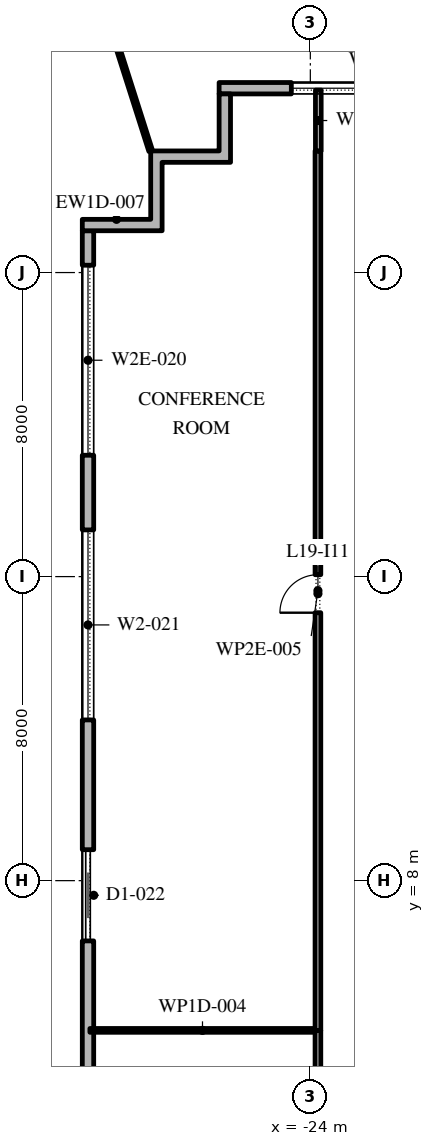
"""IFC4 building model, lengths in metres.
Left out: names, types, materials, properties, quantities, classifications, styles, units other than length and angle.
Written with IfcOpenShell. Run it as: python <this file> out.ifc"""

import sys

from ifc_helpers import new_model, si_unit, direction, frame, frame_2d, origin, place, context, subcontext, project, spatial, polyline, rectangle, outline, extrude, element, fill, save


model = new_model("IFC4")
c1 = context("Model", 3, precision=1e-05, world=origin(), true_north=direction((0.0, 1.0)))
c2 = subcontext(c1, "Body", "Model", "MODEL_VIEW")
j1 = project(units=[si_unit("LENGTHUNIT", "METRE"), si_unit("PLANEANGLEUNIT", "RADIAN")], contexts=[c1])
p1 = place(None, origin())
s1 = spatial("IfcSite", under=j1, at=p1, CompositionType="ELEMENT")
p2 = place(p1, origin())
s2 = spatial("IfcBuilding", under=s1, at=p2, CompositionType="ELEMENT")
p3 = place(p2, frame((0.0, 0.0, 90.0)))
s3 = spatial("IfcBuildingStorey", under=s2, at=p3, CompositionType="ELEMENT", Elevation=90.0)
p4 = place(p3, frame((26.1, 28.85, 0.0), z_axis=(0.0, 0.0, 1.0), x_axis=(-1.0, 0.0, 0.0)))
e1 = element("IfcWall", 1, at=p4, inside=s3, PredefinedType="STANDARD", context=c2, shape_type="SweptSolid", body=[
    extrude(rectangle(XDim=52.5, YDim=0.3, at=frame_2d((26.25, 0.0))), origin(), (0.0, 0.0, 1.0), 3.9),
])
p5 = place(p4, frame((1.75, 0.0, 0.45)))
e2 = element("IfcOpeningElement", 2, at=p5, cuts=e1, PredefinedType="OPENING", context=c2, shape_type="SweptSolid", body=[
    extrude(rectangle(XDim=5.0, YDim=2.775, at=frame_2d((2.5, 1.387))), frame((0.0, 0.16, 0.0), z_axis=(0.0, -1.0, 0.0), x_axis=(1.0, 0.0, 0.0)), (0.0, 0.0, 1.0), 0.32),
])
p6 = place(p4, frame((10.4, 0.0, 0.45)))
e3 = element("IfcOpeningElement", 3, at=p6, cuts=e1, PredefinedType="OPENING", context=c2, shape_type="SweptSolid", body=[
    extrude(rectangle(XDim=5.0, YDim=2.775, at=frame_2d((2.5, 1.387))), frame((0.0, 0.16, 0.0), z_axis=(0.0, -1.0, 0.0), x_axis=(1.0, 0.0, 0.0)), (0.0, 0.0, 1.0), 0.32),
])
p7 = place(p4, frame((20.5, 0.0, 0.0)))
e4 = element("IfcOpeningElement", 4, at=p7, cuts=e1, PredefinedType="OPENING", context=c2, shape_type="SweptSolid", body=[
    extrude(rectangle(XDim=2.4, YDim=3.5, at=frame_2d((1.2, 1.75))), frame((0.0, 0.16, 0.0), z_axis=(0.0, -1.0, 0.0), x_axis=(1.0, 0.0, 0.0)), (0.0, 0.0, 1.0), 0.32),
])
p8 = place(p4, frame((28.0, 0.0, 0.45)))
e5 = element("IfcOpeningElement", 5, at=p8, cuts=e1, PredefinedType="OPENING", context=c2, shape_type="SweptSolid", body=[
    extrude(rectangle(XDim=5.0, YDim=2.775, at=frame_2d((2.5, 1.387))), frame((0.0, 0.16, 0.0), z_axis=(0.0, -1.0, 0.0), x_axis=(1.0, 0.0, 0.0)), (0.0, 0.0, 1.0), 0.32),
])
p9 = place(p4, frame((36.8, 0.0, 0.45)))
e6 = element("IfcOpeningElement", 6, at=p9, cuts=e1, PredefinedType="OPENING", context=c2, shape_type="SweptSolid", body=[
    extrude(rectangle(XDim=5.0, YDim=2.775, at=frame_2d((2.5, 1.387))), frame((0.0, 0.16, 0.0), z_axis=(0.0, -1.0, 0.0), x_axis=(1.0, 0.0, 0.0)), (0.0, 0.0, 1.0), 0.32),
])
p10 = place(p4, frame((45.6, 0.0, 0.45)))
e7 = element("IfcOpeningElement", 7, at=p10, cuts=e1, PredefinedType="OPENING", context=c2, shape_type="SweptSolid", body=[
    extrude(rectangle(XDim=5.0, YDim=2.775, at=frame_2d((2.5, 1.387))), frame((0.0, 0.16, 0.0), z_axis=(0.0, -1.0, 0.0), x_axis=(1.0, 0.0, 0.0)), (0.0, 0.0, 1.0), 0.32),
])
p11 = place(p3, frame((-29.85, 25.1, 0.0), z_axis=(0.0, 0.0, 1.0), x_axis=(0.0, -1.0, 0.0)))
e8 = element("IfcWall", 8, at=p11, inside=s3, PredefinedType="STANDARD", context=c2, shape_type="SweptSolid", body=[
    extrude(rectangle(XDim=49.5, YDim=0.3, at=frame_2d((24.75, 0.0))), origin(), (0.0, 0.0, 1.0), 3.9),
])
p12 = place(p11, frame((0.907, 0.0, 0.45)))
e9 = element("IfcOpeningElement", 9, at=p12, cuts=e8, PredefinedType="OPENING", context=c2, shape_type="SweptSolid", body=[
    extrude(rectangle(XDim=5.0, YDim=2.775, at=frame_2d((2.5, 1.387))), frame((0.0, 0.16, 0.0), z_axis=(0.0, -1.0, 0.0), x_axis=(1.0, 0.0, 0.0)), (0.0, 0.0, 1.0), 0.32),
])
p13 = place(p11, frame((7.871, 0.0, 0.45)))
e10 = element("IfcOpeningElement", 10, at=p13, cuts=e8, PredefinedType="OPENING", context=c2, shape_type="SweptSolid", body=[
    extrude(rectangle(XDim=5.0, YDim=3.25, at=frame_2d((2.5, 1.625))), frame((0.0, 0.16, 0.0), z_axis=(0.0, -1.0, 0.0), x_axis=(1.0, 0.0, 0.0)), (0.0, 0.0, 1.0), 0.32),
])
p14 = place(p11, frame((16.286, 0.0, 0.0)))
e11 = element("IfcOpeningElement", 11, at=p14, cuts=e8, PredefinedType="OPENING", context=c2, shape_type="SweptSolid", body=[
    extrude(rectangle(XDim=2.4, YDim=3.5, at=frame_2d((1.2, 1.75))), frame((0.0, 0.16, 0.0), z_axis=(0.0, -1.0, 0.0), x_axis=(1.0, 0.0, 0.0)), (0.0, 0.0, 1.0), 0.32),
])
p15 = place(p11, frame((22.1, 0.0, 0.45)))
e12 = element("IfcOpeningElement", 12, at=p15, cuts=e8, PredefinedType="OPENING", context=c2, shape_type="SweptSolid", body=[
    extrude(rectangle(XDim=5.0, YDim=3.25, at=frame_2d((2.5, 1.625))), frame((0.0, 0.16, 0.0), z_axis=(0.0, -1.0, 0.0), x_axis=(1.0, 0.0, 0.0)), (0.0, 0.0, 1.0), 0.32),
])
p16 = place(p11, frame((29.214, 0.0, 0.45)))
e13 = element("IfcOpeningElement", 13, at=p16, cuts=e8, PredefinedType="OPENING", context=c2, shape_type="SweptSolid", body=[
    extrude(rectangle(XDim=5.0, YDim=2.775, at=frame_2d((2.5, 1.387))), frame((0.0, 0.16, 0.0), z_axis=(0.0, -1.0, 0.0), x_axis=(1.0, 0.0, 0.0)), (0.0, 0.0, 1.0), 0.32),
])
p17 = place(p11, frame((36.329, 0.0, 0.45)))
e14 = element("IfcOpeningElement", 14, at=p17, cuts=e8, PredefinedType="OPENING", context=c2, shape_type="SweptSolid", body=[
    extrude(rectangle(XDim=5.0, YDim=2.725, at=frame_2d((2.5, 1.363))), frame((0.0, 0.16, 0.0), z_axis=(0.0, -1.0, 0.0), x_axis=(1.0, 0.0, 0.0)), (0.0, 0.0, 1.0), 0.32),
])
p18 = place(p11, frame((44.743, 0.0, 0.0)))
e15 = element("IfcOpeningElement", 15, at=p18, cuts=e8, PredefinedType="OPENING", context=c2, shape_type="SweptSolid", body=[
    extrude(rectangle(XDim=2.4, YDim=3.5, at=frame_2d((1.2, 1.75))), frame((0.0, 0.16, 0.0), z_axis=(0.0, -1.0, 0.0), x_axis=(1.0, 0.0, 0.0)), (0.0, 0.0, 1.0), 0.32),
])
p19 = place(p3, origin())
e16 = element("IfcWall", 16, at=p19, inside=s3, PredefinedType="STANDARD", context=c2, shape_type="SweptSolid", body=[
    extrude(outline(polyline([(-28.2, 25.4), (-28.2, 27.2), (-26.4, 27.2), (-26.4, 28.7), (-26.1, 28.7), (-26.1, 26.9), (-27.9, 26.9), (-27.9, 25.1), (-30.0, 25.1), (-30.0, 25.4), (-28.2, 25.4)])), origin(), (0.0, 0.0, 1.0), 3.9),
])
p20 = place(p3, frame((-28.2, 27.2, -0.05), z_axis=(0.0, 0.0, 1.0), x_axis=(-0.303785653439, 0.952740403659, 0.0)))
e17 = element("IfcWall", 17, at=p20, inside=s3, PredefinedType="STANDARD", context=c2, shape_type="SweptSolid", body=[
    extrude(rectangle(XDim=6.891, YDim=0.1, at=frame_2d((3.445, 0.0))), origin(), (0.0, 0.0, 1.0), 3.95),
])
p21 = place(p3, frame((-23.8, -17.29, 0.0), z_axis=(0.0, 0.0, 1.0), x_axis=(0.0, 1.0, 0.0)))
e18 = element("IfcWall", 18, at=p21, inside=s3, PredefinedType="PARTITIONING", context=c2, shape_type="SweptSolid", body=[
    extrude(rectangle(XDim=21.35, YDim=0.15, at=frame_2d((10.675, 0.0))), origin(), (0.0, 0.0, 1.0), 3.9),
])
p22 = place(p21, frame((10.2, 0.0, 0.0)))
e19 = element("IfcOpeningElement", 19, at=p22, cuts=e18, PredefinedType="OPENING", context=c2, shape_type="SweptSolid", body=[
    extrude(rectangle(XDim=1.0, YDim=2.1, at=frame_2d((0.5, 1.05))), frame((0.0, 0.085, 0.0), z_axis=(0.0, -1.0, 0.0), x_axis=(1.0, 0.0, 0.0)), (0.0, 0.0, 1.0), 0.17),
])
p23 = place(p3, frame((-23.875, 4.06, 0.0), z_axis=(0.0, 0.0, 1.0), x_axis=(-1.0, 0.0, 0.0)))
e20 = element("IfcWall", 20, at=p23, inside=s3, PredefinedType="PARTITIONING", context=c2, shape_type="SweptSolid", body=[
    extrude(rectangle(XDim=5.925, YDim=0.1, at=frame_2d((2.962, 0.0))), origin(), (0.0, 0.0, 1.0), 3.9),
])
p24 = place(p3, frame((-23.8, 4.06, 0.0), z_axis=(0.0, 0.0, 1.0), x_axis=(0.0, 1.0, 0.0)))
e21 = element("IfcWall", 21, at=p24, inside=s3, PredefinedType="PARTITIONING", context=c2, shape_type="SweptSolid", body=[
    extrude(rectangle(XDim=23.14, YDim=0.15, at=frame_2d((11.57, 0.0))), origin(), (0.0, 0.0, 1.0), 3.9),
])
p25 = place(p24, frame((10.99, 0.0, 0.0)))
e22 = element("IfcOpeningElement", 22, at=p25, cuts=e21, PredefinedType="OPENING", context=c2, shape_type="SweptSolid", body=[
    extrude(rectangle(XDim=1.0, YDim=2.1, at=frame_2d((0.5, 1.05))), frame((0.0, 0.085, 0.0), z_axis=(0.0, -1.0, 0.0), x_axis=(1.0, 0.0, 0.0)), (0.0, 0.0, 1.0), 0.17),
])
p26 = place(p3, frame((-23.79, 27.2, 0.0), z_axis=(0.0, 0.0, 1.0), x_axis=(0.0, 1.0, 0.0)))
e23 = element("IfcWall", 23, at=p26, inside=s3, PredefinedType="PARTITIONING", context=c2, shape_type="SweptSolid", body=[
    extrude(rectangle(XDim=1.6, YDim=0.15, at=frame_2d((0.8, 0.0))), origin(), (0.0, 0.0, 1.0), 3.9),
])
p27 = place(p10, origin())
e24 = element("IfcWindow", 24, at=p27, inside=s3, PartitioningType="DOUBLE_PANEL_VERTICAL", PredefinedType="WINDOW", context=c2, shape_type="SweptSolid", body=[
    extrude(rectangle(XDim=5.0, YDim=2.775, at=frame_2d((2.5, 1.387))), frame((0.0, 0.03, 0.0), z_axis=(0.0, -1.0, 0.0), x_axis=(1.0, 0.0, 0.0)), (0.0, 0.0, 1.0), 0.06),
])
fill(e7, e24)
p28 = place(p12, origin())
e25 = element("IfcWindow", 25, at=p28, inside=s3, PartitioningType="DOUBLE_PANEL_VERTICAL", PredefinedType="WINDOW", context=c2, shape_type="SweptSolid", body=[
    extrude(rectangle(XDim=5.0, YDim=2.775, at=frame_2d((2.5, 1.387))), frame((0.0, 0.03, 0.0), z_axis=(0.0, -1.0, 0.0), x_axis=(1.0, 0.0, 0.0)), (0.0, 0.0, 1.0), 0.06),
])
fill(e9, e25)
p29 = place(p13, origin())
e26 = element("IfcWindow", 26, at=p29, inside=s3, PartitioningType="DOUBLE_PANEL_VERTICAL", PredefinedType="WINDOW", context=c2, shape_type="SweptSolid", body=[
    extrude(rectangle(XDim=5.0, YDim=3.25, at=frame_2d((2.5, 1.625))), frame((0.0, 0.03, 0.0), z_axis=(0.0, -1.0, 0.0), x_axis=(1.0, 0.0, 0.0)), (0.0, 0.0, 1.0), 0.06),
])
fill(e10, e26)
p30 = place(p14, origin())
e27 = element("IfcDoor", 27, at=p30, inside=s3, OperationType="DOUBLE_DOOR_SLIDING", PredefinedType="DOOR", context=c2, shape_type="SweptSolid", body=[
    extrude(rectangle(XDim=2.4, YDim=3.5, at=frame_2d((1.2, 1.75))), frame((0.0, 0.025, 0.0), z_axis=(0.0, -1.0, 0.0), x_axis=(1.0, 0.0, 0.0)), (0.0, 0.0, 1.0), 0.05),
])
fill(e11, e27)
p31 = place(p25, origin())
e28 = element("IfcDoor", 28, at=p31, inside=s3, OperationType="SINGLE_SWING_RIGHT", PredefinedType="DOOR", context=c2, shape_type="SweptSolid", body=[
    extrude(rectangle(XDim=1.0, YDim=2.1, at=frame_2d((0.5, 1.05))), frame((0.0, 0.025, 0.0), z_axis=(0.0, -1.0, 0.0), x_axis=(1.0, 0.0, 0.0)), (0.0, 0.0, 1.0), 0.05),
])
fill(e22, e28)
save(model, sys.argv[1])
